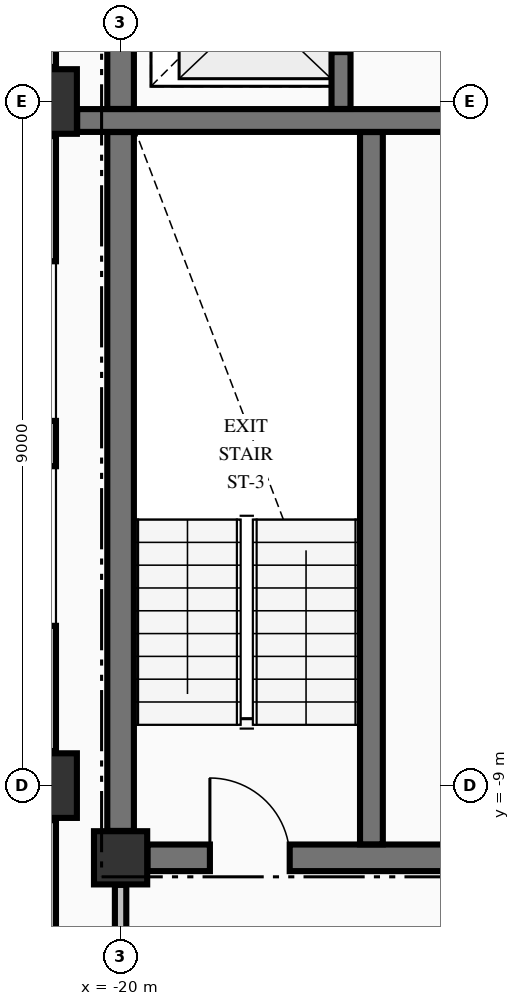
"""IFC4 building model, lengths in metres.
Left out: names, types, materials, properties, quantities, classifications, styles, units other than length and angle.
Written with IfcOpenShell. Run it as: python <this file> out.ifc"""

import sys

from ifc_helpers import new_model, si_unit, direction, frame, frame_2d, origin, origin_2d, place, context, subcontext, project, spatial, rectangle, extrude, element, fill, save


model = new_model("IFC4")
c1 = context("Model", 3, precision=1e-05, world=origin(), true_north=direction((0.0, 1.0)))
c2 = subcontext(c1, "Body", "Model", "MODEL_VIEW")
j1 = project(units=[si_unit("LENGTHUNIT", "METRE"), si_unit("PLANEANGLEUNIT", "RADIAN")], contexts=[c1])
p1 = place(None, origin())
s1 = spatial("IfcSite", under=j1, at=p1, CompositionType="ELEMENT")
p2 = place(p1, origin())
s2 = spatial("IfcBuilding", under=s1, at=p2, CompositionType="ELEMENT")
p3 = place(p2, frame((0.0, 0.0, 233.28)))
s3 = spatial("IfcBuildingStorey", under=s2, at=p3, CompositionType="ELEMENT", Elevation=233.28)
for number, where, z_axis, x_axis in (
    (1, (-21.0, -9.0, -0.25), (0.0, 0.0, 1.0), (1.0, 0.0, 0.0)),
    (2, (-21.0, 0.0, -0.25), (0.0, 0.0, 1.0), (1.0, 0.0, 0.0)),
):
    element("IfcColumn", number, at=place(p3, frame(where, z_axis=z_axis, x_axis=x_axis)), inside=s3, PredefinedType="COLUMN", context=c2, shape_type="SweptSolid", body=[
        extrude(rectangle(XDim=0.85, YDim=0.85, at=origin_2d()), origin(), (0.0, 0.0, 1.0), 3.23),
    ])
p4 = place(p3, frame((-20.0, -9.95, -0.25), z_axis=(0.0, 0.0, 1.0), x_axis=(1.0, 0.0, 0.0)))
e3 = element("IfcColumn", 3, at=p4, inside=s3, PredefinedType="COLUMN", context=c2, shape_type="SweptSolid", body=[
    extrude(rectangle(XDim=0.7, YDim=0.7, at=origin_2d()), origin(), (0.0, 0.0, 1.0), 3.23),
])
p5 = place(p3, frame((-21.0, -9.455, 0.0), z_axis=(0.0, 0.0, 1.0), x_axis=(0.0, -1.0, 0.0)))
e4 = element("IfcWall", 4, at=p5, inside=s3, PredefinedType="STANDARD", context=c2, shape_type="SweptSolid", body=[
    extrude(rectangle(XDim=8.09, YDim=0.3, at=frame_2d((4.045, 0.0))), origin(), (0.0, 0.0, 1.0), 2.372),
])
p6 = place(p3, frame((-21.0, -0.455, 0.0), z_axis=(0.0, 0.0, 1.0), x_axis=(0.0, -1.0, 0.0)))
e5 = element("IfcWall", 5, at=p6, inside=s3, PredefinedType="STANDARD", context=c2, shape_type="SweptSolid", body=[
    extrude(rectangle(XDim=8.09, YDim=0.3, at=frame_2d((4.045, 0.0))), origin(), (0.0, 0.0, 1.0), 2.372),
])
p7 = place(p6, frame((1.647, 0.0, 0.7)))
e6 = element("IfcOpeningElement", 6, at=p7, cuts=e5, PredefinedType="OPENING", context=c2, shape_type="SweptSolid", body=[
    extrude(rectangle(XDim=2.1, YDim=1.5, at=frame_2d((1.05, 0.75))), frame((0.0, 0.16, 0.0), z_axis=(0.0, -1.0, 0.0), x_axis=(1.0, 0.0, 0.0)), (0.0, 0.0, 1.0), 0.32),
])
p8 = place(p6, frame((4.343, 0.0, 0.7)))
e7 = element("IfcOpeningElement", 7, at=p8, cuts=e5, PredefinedType="OPENING", context=c2, shape_type="SweptSolid", body=[
    extrude(rectangle(XDim=2.1, YDim=1.5, at=frame_2d((1.05, 0.75))), frame((0.0, 0.16, 0.0), z_axis=(0.0, -1.0, 0.0), x_axis=(1.0, 0.0, 0.0)), (0.0, 0.0, 1.0), 0.32),
])
p9 = place(p3, frame((-21.0, 8.545, 0.0), z_axis=(0.0, 0.0, 1.0), x_axis=(0.0, -1.0, 0.0)))
e8 = element("IfcWall", 8, at=p9, inside=s3, PredefinedType="STANDARD", context=c2, shape_type="SweptSolid", body=[
    extrude(rectangle(XDim=8.09, YDim=0.3, at=frame_2d((4.045, 0.0))), origin(), (0.0, 0.0, 1.0), 2.372),
])
p10 = place(p9, frame((1.647, 0.0, 0.7)))
e9 = element("IfcOpeningElement", 9, at=p10, cuts=e8, PredefinedType="OPENING", context=c2, shape_type="SweptSolid", body=[
    extrude(rectangle(XDim=2.1, YDim=1.5, at=frame_2d((1.05, 0.75))), frame((0.0, 0.16, 0.0), z_axis=(0.0, -1.0, 0.0), x_axis=(1.0, 0.0, 0.0)), (0.0, 0.0, 1.0), 0.32),
])
p11 = place(p9, frame((4.343, 0.0, 0.7)))
e10 = element("IfcOpeningElement", 10, at=p11, cuts=e8, PredefinedType="OPENING", context=c2, shape_type="SweptSolid", body=[
    extrude(rectangle(XDim=2.1, YDim=1.5, at=frame_2d((1.05, 0.75))), frame((0.0, 0.16, 0.0), z_axis=(0.0, -1.0, 0.0), x_axis=(1.0, 0.0, 0.0)), (0.0, 0.0, 1.0), 0.32),
])
p12 = place(p3, frame((-19.646, -9.95, 0.0), z_axis=(0.0, 0.0, 1.0), x_axis=(1.0, 0.0, 0.0)))
e11 = element("IfcWall", 11, at=p12, inside=s3, PredefinedType="SHEAR", context=c2, shape_type="SweptSolid", body=[
    extrude(rectangle(XDim=4.946, YDim=0.35, at=frame_2d((2.473, 0.0))), origin(), (0.0, 0.0, 1.0), 2.98),
])
p13 = place(p12, frame((0.821, 0.0, 0.0)))
e12 = element("IfcOpeningElement", 12, at=p13, cuts=e11, PredefinedType="OPENING", context=c2, shape_type="SweptSolid", body=[
    extrude(rectangle(XDim=1.05, YDim=2.15, at=frame_2d((0.525, 1.075))), frame((0.0, 0.185, 0.0), z_axis=(0.0, -1.0, 0.0), x_axis=(1.0, 0.0, 0.0)), (0.0, 0.0, 1.0), 0.37),
])
p14 = place(p3, frame((-20.571, -0.25, 0.0), z_axis=(0.0, 0.0, 1.0), x_axis=(1.0, 0.0, 0.0)))
e13 = element("IfcWall", 13, at=p14, inside=s3, PredefinedType="SHEAR", context=c2, shape_type="SweptSolid", body=[
    extrude(rectangle(XDim=9.217, YDim=0.3, at=frame_2d((4.608, 0.0))), origin(), (0.0, 0.0, 1.0), 2.98),
])
p15 = place(p14, frame((6.871, 0.0, 0.0)))
e14 = element("IfcOpeningElement", 14, at=p15, cuts=e13, PredefinedType="OPENING", context=c2, shape_type="SweptSolid", body=[
    extrude(rectangle(XDim=1.1, YDim=2.15, at=frame_2d((0.55, 1.075))), frame((0.0, 0.16, 0.0), z_axis=(0.0, -1.0, 0.0), x_axis=(1.0, 0.0, 0.0)), (0.0, 0.0, 1.0), 0.32),
])
p16 = place(p3, frame((-20.0, -9.596, 0.0), z_axis=(0.0, 0.0, 1.0), x_axis=(0.0, 1.0, 0.0)))
e15 = element("IfcWall", 15, at=p16, inside=s3, PredefinedType="SHEAR", context=c2, shape_type="SweptSolid", body=[
    extrude(rectangle(XDim=9.194, YDim=0.35, at=frame_2d((4.597, 0.0))), origin(), (0.0, 0.0, 1.0), 2.98),
])
p17 = place(p3, frame((-20.0, -0.098, 0.0), z_axis=(0.0, 0.0, 1.0), x_axis=(0.0, 1.0, 0.0)))
e16 = element("IfcWall", 16, at=p17, inside=s3, PredefinedType="SHEAR", context=c2, shape_type="SweptSolid", body=[
    extrude(rectangle(XDim=2.621, YDim=0.35, at=frame_2d((1.311, 0.0))), origin(), (0.0, 0.0, 1.0), 2.98),
])
p18 = place(p3, frame((-17.1, -0.098, 0.0), z_axis=(0.0, 0.0, 1.0), x_axis=(0.0, 1.0, 0.0)))
e17 = element("IfcWall", 17, at=p18, inside=s3, PredefinedType="SOLIDWALL", context=c2, shape_type="SweptSolid", body=[
    extrude(rectangle(XDim=2.621, YDim=0.25, at=frame_2d((1.311, 0.0))), origin(), (0.0, 0.0, 1.0), 2.98),
])
p19 = place(p18, frame((0.748, 0.0, 0.0)))
e18 = element("IfcOpeningElement", 18, at=p19, cuts=e17, PredefinedType="OPENING", context=c2, shape_type="SweptSolid", body=[
    extrude(rectangle(XDim=1.1, YDim=2.2, at=frame_2d((0.55, 1.1))), frame((0.0, 0.135, 0.0), z_axis=(0.0, -1.0, 0.0), x_axis=(1.0, 0.0, 0.0)), (0.0, 0.0, 1.0), 0.27),
])
p20 = place(p3, frame((-16.7, -9.773, 0.0), z_axis=(0.0, 0.0, 1.0), x_axis=(0.0, 1.0, 0.0)))
e19 = element("IfcWall", 19, at=p20, inside=s3, PredefinedType="SHEAR", context=c2, shape_type="SweptSolid", body=[
    extrude(rectangle(XDim=9.371, YDim=0.3, at=frame_2d((4.686, 0.0))), origin(), (0.0, 0.0, 1.0), 2.98),
])
p21 = place(p3, frame((-20.0, -12.122, 0.0), z_axis=(0.0, 0.0, 1.0), x_axis=(0.0, 1.0, 0.0)))
e20 = element("IfcWall", 20, at=p21, inside=s3, PredefinedType="PARTITIONING", context=c2, shape_type="SweptSolid", body=[
    extrude(rectangle(XDim=1.816, YDim=0.15, at=frame_2d((0.908, 0.0))), origin(), (0.0, 0.0, 1.0), 2.57),
])
p22 = place(p13, origin())
e21 = element("IfcDoor", 21, at=p22, inside=s3, OperationType="SINGLE_SWING_LEFT", PredefinedType="DOOR", context=c2, shape_type="SweptSolid", body=[
    extrude(rectangle(XDim=1.05, YDim=2.15, at=frame_2d((0.525, 1.075))), frame((0.0, 0.025, 0.0), z_axis=(0.0, -1.0, 0.0), x_axis=(1.0, 0.0, 0.0)), (0.0, 0.0, 1.0), 0.05),
])
fill(e12, e21)
save(model, sys.argv[1])
